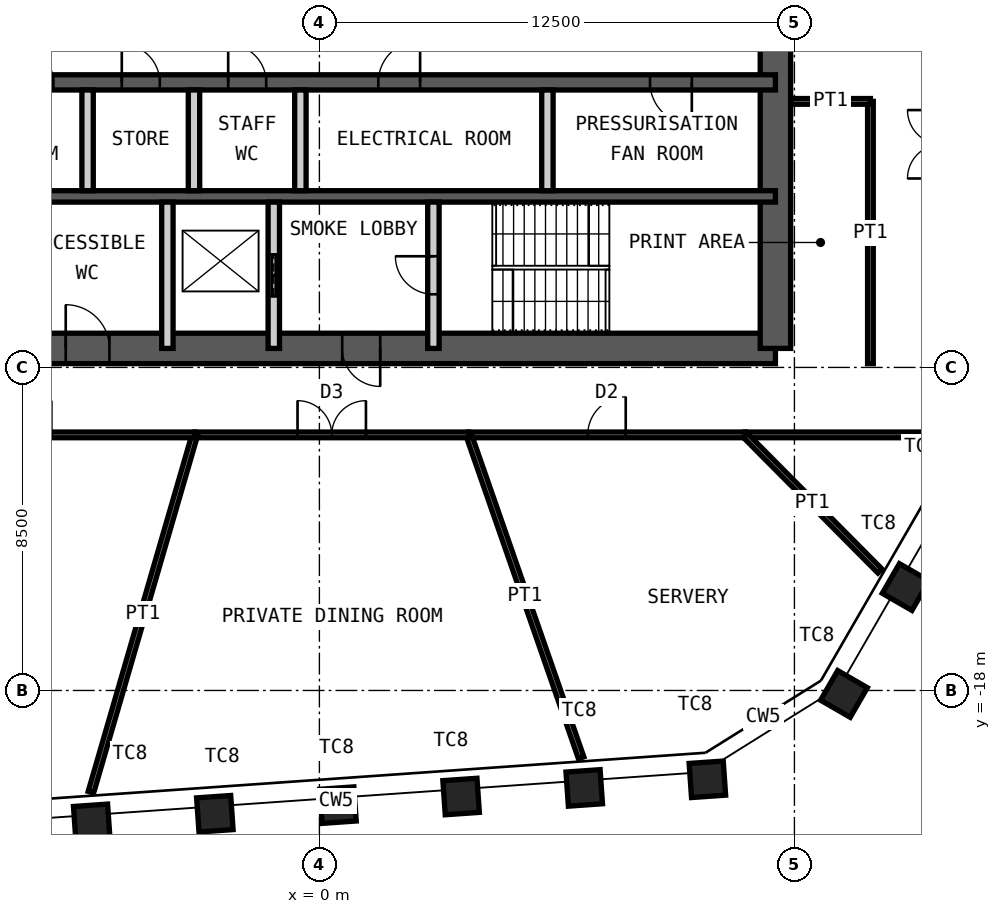
"""IFC4 building model, lengths in metres.
Left out: names, types, materials, properties, quantities, classifications, styles, units other than length and angle.
Written with IfcOpenShell. Run it as: python <this file> out.ifc"""

import sys

from ifc_helpers import new_model, si_unit, direction, frame, frame_2d, origin, origin_2d, place, context, subcontext, project, spatial, rectangle, hollow_rectangle, extrude, element, fill, save


model = new_model("IFC4")
c1 = context("Model", 3, precision=1e-05, world=origin(), true_north=direction((0.0, 1.0)))
c2 = subcontext(c1, "Body", "Model", "MODEL_VIEW")
j1 = project(units=[si_unit("LENGTHUNIT", "METRE"), si_unit("PLANEANGLEUNIT", "RADIAN")], contexts=[c1])
p1 = place(None, origin())
s1 = spatial("IfcSite", under=j1, at=p1, CompositionType="ELEMENT")
p2 = place(p1, origin())
s2 = spatial("IfcBuilding", under=s1, at=p2, CompositionType="ELEMENT")
p3 = place(p2, frame((0.0, 0.0, 320.8)))
s3 = spatial("IfcBuildingStorey", under=s2, at=p3, CompositionType="ELEMENT", Elevation=320.8)
for number, where, z_axis, x_axis in (
    (1, (15.427, -15.279, 0.0), (0.0, 0.0, 1.0), (0.5, 0.866, 0.0)),
    (2, (13.803, -18.092, 0.0), (0.0, 0.0, 1.0), (0.5, 0.866, 0.0)),
    (3, (10.209, -20.337, 0.0), (0.0, 0.0, 1.0), (0.998, 0.07, 0.0)),
    (4, (6.969, -20.564, 0.0), (0.0, 0.0, 1.0), (0.998, 0.07, 0.0)),
    (5, (3.729, -20.791, 0.0), (0.0, 0.0, 1.0), (0.998, 0.07, 0.0)),
    (6, (0.489, -21.017, 0.0), (0.0, 0.0, 1.0), (0.998, 0.07, 0.0)),
    (7, (-2.751, -21.244, 0.0), (0.0, 0.0, 1.0), (0.998, 0.07, 0.0)),
    (8, (-5.991, -21.47, 0.0), (0.0, 0.0, 1.0), (0.998, 0.07, 0.0)),
):
    element("IfcColumn", number, at=place(p3, frame(where, z_axis=z_axis, x_axis=x_axis)), inside=s3, PredefinedType="COLUMN", context=c2, shape_type="SweptSolid", body=[
        extrude(hollow_rectangle(XDim=0.9, YDim=0.9, WallThickness=0.05, at=origin_2d()), origin(), (0.0, 0.0, 1.0), 4.2),
    ])
p4 = place(p3, frame((-12.0, -9.0, 0.0), z_axis=(0.0, 0.0, 1.0), x_axis=(1.0, 0.0, 0.0)))
e9 = element("IfcWall", 9, at=p4, inside=s3, PredefinedType="SHEAR", context=c2, shape_type="SweptSolid", body=[
    extrude(rectangle(XDim=24.0, YDim=0.8, at=frame_2d((12.0, 0.0))), origin(), (0.0, 0.0, 1.0), 4.2),
])
p5 = place(p4, frame((1.35, 0.0, 0.0)))
e10 = element("IfcOpeningElement", 10, at=p5, cuts=e9, PredefinedType="OPENING", context=c2, shape_type="SweptSolid", body=[
    extrude(rectangle(XDim=1.0, YDim=2.1, at=frame_2d((0.5, 1.05))), frame((0.0, 0.41, 0.0), z_axis=(0.0, -1.0, 0.0), x_axis=(1.0, 0.0, 0.0)), (0.0, 0.0, 1.0), 0.82),
])
p6 = place(p4, frame((5.325, 0.0, 0.0)))
e11 = element("IfcOpeningElement", 11, at=p6, cuts=e9, PredefinedType="OPENING", context=c2, shape_type="SweptSolid", body=[
    extrude(rectangle(XDim=1.15, YDim=2.1, at=frame_2d((0.575, 1.05))), frame((0.0, 0.41, 0.0), z_axis=(0.0, -1.0, 0.0), x_axis=(1.0, 0.0, 0.0)), (0.0, 0.0, 1.0), 0.82),
])
p7 = place(p4, frame((12.6, 0.0, 0.0)))
e12 = element("IfcOpeningElement", 12, at=p7, cuts=e9, PredefinedType="OPENING", context=c2, shape_type="SweptSolid", body=[
    extrude(rectangle(XDim=1.0, YDim=2.1, at=frame_2d((0.5, 1.05))), frame((0.0, 0.41, 0.0), z_axis=(0.0, -1.0, 0.0), x_axis=(1.0, 0.0, 0.0)), (0.0, 0.0, 1.0), 0.82),
])
p8 = place(p3, frame((12.0, -9.0, 0.0), z_axis=(0.0, 0.0, 1.0), x_axis=(0.0, 1.0, 0.0)))
e13 = element("IfcWall", 13, at=p8, inside=s3, PredefinedType="SHEAR", context=c2, shape_type="SweptSolid", body=[
    extrude(rectangle(XDim=18.0, YDim=0.8, at=frame_2d((9.0, 0.0))), origin(), (0.0, 0.0, 1.0), 4.2),
])
p9 = place(p8, frame((8.1, 0.0, 0.0)))
e14 = element("IfcOpeningElement", 14, at=p9, cuts=e13, PredefinedType="OPENING", context=c2, shape_type="SweptSolid", body=[
    extrude(rectangle(XDim=1.8, YDim=2.1, at=frame_2d((0.9, 1.05))), frame((0.0, 0.41, 0.0), z_axis=(0.0, -1.0, 0.0), x_axis=(1.0, 0.0, 0.0)), (0.0, 0.0, 1.0), 0.82),
])
p10 = place(p3, frame((-12.0, -2.0, 0.0), z_axis=(0.0, 0.0, 1.0), x_axis=(1.0, 0.0, 0.0)))
e15 = element("IfcWall", 15, at=p10, inside=s3, PredefinedType="SHEAR", context=c2, shape_type="SweptSolid", body=[
    extrude(rectangle(XDim=24.0, YDim=0.4, at=frame_2d((12.0, 0.0))), origin(), (0.0, 0.0, 1.0), 4.2),
])
p11 = place(p10, frame((1.1, 0.0, 0.0)))
e16 = element("IfcOpeningElement", 16, at=p11, cuts=e15, PredefinedType="OPENING", context=c2, shape_type="SweptSolid", body=[
    extrude(rectangle(XDim=1.1, YDim=2.1, at=frame_2d((0.55, 1.05))), frame((0.0, 0.21, 0.0), z_axis=(0.0, -1.0, 0.0), x_axis=(1.0, 0.0, 0.0)), (0.0, 0.0, 1.0), 0.42),
])
p12 = place(p10, frame((13.55, 0.0, 0.0)))
e17 = element("IfcOpeningElement", 17, at=p12, cuts=e15, PredefinedType="OPENING", context=c2, shape_type="SweptSolid", body=[
    extrude(rectangle(XDim=1.1, YDim=2.1, at=frame_2d((0.55, 1.05))), frame((0.0, 0.21, 0.0), z_axis=(0.0, -1.0, 0.0), x_axis=(1.0, 0.0, 0.0)), (0.0, 0.0, 1.0), 0.42),
])
p13 = place(p10, frame((20.7, 0.0, 0.0)))
e18 = element("IfcOpeningElement", 18, at=p13, cuts=e15, PredefinedType="OPENING", context=c2, shape_type="SweptSolid", body=[
    extrude(rectangle(XDim=1.1, YDim=2.1, at=frame_2d((0.55, 1.05))), frame((0.0, 0.21, 0.0), z_axis=(0.0, -1.0, 0.0), x_axis=(1.0, 0.0, 0.0)), (0.0, 0.0, 1.0), 0.42),
])
p14 = place(p10, frame((4.0, 0.0, 0.0)))
e19 = element("IfcOpeningElement", 19, at=p14, cuts=e15, PredefinedType="OPENING", context=c2, shape_type="SweptSolid", body=[
    extrude(rectangle(XDim=1.0, YDim=2.1, at=frame_2d((0.5, 1.05))), frame((0.0, 0.21, 0.0), z_axis=(0.0, -1.0, 0.0), x_axis=(1.0, 0.0, 0.0)), (0.0, 0.0, 1.0), 0.42),
])
p15 = place(p10, frame((6.8, 0.0, 0.0)))
e20 = element("IfcOpeningElement", 20, at=p15, cuts=e15, PredefinedType="OPENING", context=c2, shape_type="SweptSolid", body=[
    extrude(rectangle(XDim=1.0, YDim=2.1, at=frame_2d((0.5, 1.05))), frame((0.0, 0.21, 0.0), z_axis=(0.0, -1.0, 0.0), x_axis=(1.0, 0.0, 0.0)), (0.0, 0.0, 1.0), 0.42),
])
p16 = place(p10, frame((9.6, 0.0, 0.0)))
e21 = element("IfcOpeningElement", 21, at=p16, cuts=e15, PredefinedType="OPENING", context=c2, shape_type="SweptSolid", body=[
    extrude(rectangle(XDim=1.0, YDim=2.1, at=frame_2d((0.5, 1.05))), frame((0.0, 0.21, 0.0), z_axis=(0.0, -1.0, 0.0), x_axis=(1.0, 0.0, 0.0)), (0.0, 0.0, 1.0), 0.42),
])
p17 = place(p3, frame((-12.0, -5.0, 0.0), z_axis=(0.0, 0.0, 1.0), x_axis=(1.0, 0.0, 0.0)))
e22 = element("IfcWall", 22, at=p17, inside=s3, PredefinedType="SHEAR", context=c2, shape_type="SweptSolid", body=[
    extrude(rectangle(XDim=24.0, YDim=0.3, at=frame_2d((12.0, 0.0))), origin(), (0.0, 0.0, 1.0), 4.2),
])
for number, where, z_axis, x_axis in (
    (23, (-6.1, -4.85, 0.0), (0.0, 0.0, 1.0), (0.0, 1.0, 0.0)),
    (24, (-3.3, -4.85, 0.0), (0.0, 0.0, 1.0), (0.0, 1.0, 0.0)),
    (25, (-0.5, -4.85, 0.0), (0.0, 0.0, 1.0), (0.0, 1.0, 0.0)),
    (26, (6.0, -4.85, 0.0), (0.0, 0.0, 1.0), (0.0, 1.0, 0.0)),
):
    element("IfcWall", number, at=place(p3, frame(where, z_axis=z_axis, x_axis=x_axis)), inside=s3, PredefinedType="PARTITIONING", context=c2, shape_type="SweptSolid", body=[
        extrude(rectangle(XDim=2.65, YDim=0.3, at=frame_2d((1.325, 0.0))), origin(), (0.0, 0.0, 1.0), 3.98),
    ])
p18 = place(p3, frame((-4.0, -9.0, 0.0), z_axis=(0.0, 0.0, 1.0), x_axis=(0.0, 1.0, 0.0)))
e27 = element("IfcWall", 27, at=p18, inside=s3, PredefinedType="PARTITIONING", context=c2, shape_type="SweptSolid", body=[
    extrude(rectangle(XDim=3.85, YDim=0.3, at=frame_2d((1.925, 0.0))), origin(), (0.0, 0.0, 1.0), 3.98),
])
p19 = place(p3, frame((-1.2, -9.0, 0.0), z_axis=(0.0, 0.0, 1.0), x_axis=(0.0, 1.0, 0.0)))
e28 = element("IfcWall", 28, at=p19, inside=s3, PredefinedType="PARTITIONING", context=c2, shape_type="SweptSolid", body=[
    extrude(rectangle(XDim=3.85, YDim=0.3, at=frame_2d((1.925, 0.0))), origin(), (0.0, 0.0, 1.0), 3.98),
])
p20 = place(p19, frame((1.375, 0.0, 0.0)))
e29 = element("IfcOpeningElement", 29, at=p20, cuts=e28, PredefinedType="OPENING", context=c2, shape_type="SweptSolid", body=[
    extrude(rectangle(XDim=1.1, YDim=2.4, at=frame_2d((0.55, 1.2))), frame((0.0, 0.16, 0.0), z_axis=(0.0, -1.0, 0.0), x_axis=(1.0, 0.0, 0.0)), (0.0, 0.0, 1.0), 0.32),
])
p21 = place(p3, frame((3.0, -9.0, 0.0), z_axis=(0.0, 0.0, 1.0), x_axis=(0.0, 1.0, 0.0)))
e30 = element("IfcWall", 30, at=p21, inside=s3, PredefinedType="PARTITIONING", context=c2, shape_type="SweptSolid", body=[
    extrude(rectangle(XDim=3.85, YDim=0.3, at=frame_2d((1.925, 0.0))), origin(), (0.0, 0.0, 1.0), 3.98),
])
p22 = place(p21, frame((1.425, 0.0, 0.0)))
e31 = element("IfcOpeningElement", 31, at=p22, cuts=e30, PredefinedType="OPENING", context=c2, shape_type="SweptSolid", body=[
    extrude(rectangle(XDim=1.0, YDim=2.1, at=frame_2d((0.5, 1.05))), frame((0.0, 0.16, 0.0), z_axis=(0.0, -1.0, 0.0), x_axis=(1.0, 0.0, 0.0)), (0.0, 0.0, 1.0), 0.32),
])
p23 = place(p3, frame((16.375, -11.275, 0.0), z_axis=(0.0, 0.0, 1.0), x_axis=(-1.0, 0.0, 0.0)))
e32 = element("IfcWall", 32, at=p23, inside=s3, PredefinedType="PARTITIONING", context=c2, shape_type="SweptSolid", body=[
    extrude(rectangle(XDim=5.181, YDim=0.15, at=frame_2d((2.59, 0.0))), origin(), (0.0, 0.0, 1.0), 4.03),
])
p24 = place(p3, frame((14.751, -14.858, 0.0), z_axis=(0.0, 0.0, 1.0), x_axis=(-0.704539120613, 0.709665151692, 0.0)))
e33 = element("IfcWall", 33, at=p24, inside=s3, PredefinedType="PARTITIONING", context=c2, shape_type="SweptSolid", body=[
    extrude(rectangle(XDim=5.049, YDim=0.15, at=frame_2d((2.524, 0.0))), origin(), (0.0, 0.0, 1.0), 3.33),
])
p25 = place(p3, frame((11.194, -11.275, 0.0), z_axis=(0.0, 0.0, 1.0), x_axis=(-1.0, 0.0, 0.0)))
e34 = element("IfcWall", 34, at=p25, inside=s3, PredefinedType="PARTITIONING", context=c2, shape_type="SweptSolid", body=[
    extrude(rectangle(XDim=7.266, YDim=0.15, at=frame_2d((3.633, 0.0))), origin(), (0.0, 0.0, 1.0), 4.03),
])
p26 = place(p25, frame((3.133, 0.0, 0.0)))
e35 = element("IfcOpeningElement", 35, at=p26, cuts=e34, PredefinedType="OPENING", context=c2, shape_type="SweptSolid", body=[
    extrude(rectangle(XDim=1.0, YDim=2.4, at=frame_2d((0.5, 1.2))), frame((0.0, 0.085, 0.0), z_axis=(0.0, -1.0, 0.0), x_axis=(1.0, 0.0, 0.0)), (0.0, 0.0, 1.0), 0.17),
])
p27 = place(p3, frame((6.888, -19.771, 0.0), z_axis=(0.0, 0.0, 1.0), x_axis=(-0.328987878601, 0.944334144111, 0.0)))
e36 = element("IfcWall", 36, at=p27, inside=s3, PredefinedType="PARTITIONING", context=c2, shape_type="SweptSolid", body=[
    extrude(rectangle(XDim=8.997, YDim=0.15, at=frame_2d((4.499, 0.0))), origin(), (0.0, 0.0, 1.0), 3.33),
])
p28 = place(p3, frame((3.928, -11.275, 0.0), z_axis=(0.0, 0.0, 1.0), x_axis=(-1.0, 0.0, 0.0)))
e37 = element("IfcWall", 37, at=p28, inside=s3, PredefinedType="PARTITIONING", context=c2, shape_type="SweptSolid", body=[
    extrude(rectangle(XDim=7.206, YDim=0.15, at=frame_2d((3.603, 0.0))), origin(), (0.0, 0.0, 1.0), 4.03),
])
p29 = place(p28, frame((2.703, 0.0, 0.0)))
e38 = element("IfcOpeningElement", 38, at=p29, cuts=e37, PredefinedType="OPENING", context=c2, shape_type="SweptSolid", body=[
    extrude(rectangle(XDim=1.8, YDim=2.4, at=frame_2d((0.9, 1.2))), frame((0.0, 0.085, 0.0), z_axis=(0.0, -1.0, 0.0), x_axis=(1.0, 0.0, 0.0)), (0.0, 0.0, 1.0), 0.17),
])
p30 = place(p3, frame((-6.012, -20.676, 0.0), z_axis=(0.0, 0.0, 1.0), x_axis=(0.279197441451, 0.960233715658, 0.0)))
e39 = element("IfcWall", 39, at=p30, inside=s3, PredefinedType="PARTITIONING", context=c2, shape_type="SweptSolid", body=[
    extrude(rectangle(XDim=9.79, YDim=0.15, at=frame_2d((4.895, 0.0))), origin(), (0.0, 0.0, 1.0), 3.33),
])
p31 = place(p3, frame((-3.279, -11.275, 0.0), z_axis=(0.0, 0.0, 1.0), x_axis=(-1.0, 0.0, 0.0)))
e40 = element("IfcWall", 40, at=p31, inside=s3, PredefinedType="PARTITIONING", context=c2, shape_type="SweptSolid", body=[
    extrude(rectangle(XDim=9.349, YDim=0.15, at=frame_2d((4.675, 0.0))), origin(), (0.0, 0.0, 1.0), 4.03),
])
p32 = place(p31, frame((3.775, 0.0, 0.0)))
e41 = element("IfcOpeningElement", 41, at=p32, cuts=e40, PredefinedType="OPENING", context=c2, shape_type="SweptSolid", body=[
    extrude(rectangle(XDim=1.8, YDim=2.4, at=frame_2d((0.9, 1.2))), frame((0.0, 0.085, 0.0), z_axis=(0.0, -1.0, 0.0), x_axis=(1.0, 0.0, 0.0)), (0.0, 0.0, 1.0), 0.17),
])
p33 = place(p3, frame((14.5, -9.4, 0.0), z_axis=(0.0, 0.0, 1.0), x_axis=(0.0, 1.0, 0.0)))
e42 = element("IfcWall", 42, at=p33, inside=s3, PredefinedType="PARTITIONING", context=c2, shape_type="SweptSolid", body=[
    extrude(rectangle(XDim=6.9, YDim=0.15, at=frame_2d((3.45, 0.0))), origin(), (0.0, 0.0, 1.0), 4.03),
])
p34 = place(p3, frame((12.4, -2.5, 0.0), z_axis=(0.0, 0.0, 1.0), x_axis=(1.0, 0.0, 0.0)))
e43 = element("IfcWall", 43, at=p34, inside=s3, PredefinedType="PARTITIONING", context=c2, shape_type="SweptSolid", body=[
    extrude(rectangle(XDim=2.1, YDim=0.15, at=frame_2d((1.05, 0.0))), origin(), (0.0, 0.0, 1.0), 3.33),
])
p35 = place(p6, origin())
e44 = element("IfcDoor", 44, at=p35, inside=s3, OperationType="SINGLE_SWING_RIGHT", PredefinedType="DOOR", context=c2, shape_type="SweptSolid", body=[
    extrude(rectangle(XDim=1.15, YDim=2.1, at=frame_2d((0.575, 1.05))), frame((0.0, 0.025, 0.0), z_axis=(0.0, -1.0, 0.0), x_axis=(1.0, 0.0, 0.0)), (0.0, 0.0, 1.0), 0.05),
])
fill(e11, e44)
p36 = place(p7, origin())
e45 = element("IfcDoor", 45, at=p36, inside=s3, OperationType="SINGLE_SWING_RIGHT", PredefinedType="DOOR", context=c2, shape_type="SweptSolid", body=[
    extrude(rectangle(XDim=1.0, YDim=2.1, at=frame_2d((0.5, 1.05))), frame((0.0, 0.025, 0.0), z_axis=(0.0, -1.0, 0.0), x_axis=(1.0, 0.0, 0.0)), (0.0, 0.0, 1.0), 0.05),
])
fill(e12, e45)
p37 = place(p22, origin())
e46 = element("IfcDoor", 46, at=p37, inside=s3, OperationType="SINGLE_SWING_LEFT", PredefinedType="DOOR", context=c2, shape_type="SweptSolid", body=[
    extrude(rectangle(XDim=1.0, YDim=2.1, at=frame_2d((0.5, 1.05))), frame((0.0, 0.025, 0.0), z_axis=(0.0, -1.0, 0.0), x_axis=(1.0, 0.0, 0.0)), (0.0, 0.0, 1.0), 0.05),
])
fill(e31, e46)
p38 = place(p12, origin())
e47 = element("IfcDoor", 47, at=p38, inside=s3, OperationType="SINGLE_SWING_LEFT", PredefinedType="DOOR", context=c2, shape_type="SweptSolid", body=[
    extrude(rectangle(XDim=1.1, YDim=2.1, at=frame_2d((0.55, 1.05))), frame((0.0, 0.025, 0.0), z_axis=(0.0, -1.0, 0.0), x_axis=(1.0, 0.0, 0.0)), (0.0, 0.0, 1.0), 0.05),
])
fill(e17, e47)
p39 = place(p13, origin())
e48 = element("IfcDoor", 48, at=p39, inside=s3, OperationType="SINGLE_SWING_RIGHT", PredefinedType="DOOR", context=c2, shape_type="SweptSolid", body=[
    extrude(rectangle(XDim=1.1, YDim=2.1, at=frame_2d((0.55, 1.05))), frame((0.0, 0.025, 0.0), z_axis=(0.0, -1.0, 0.0), x_axis=(1.0, 0.0, 0.0)), (0.0, 0.0, 1.0), 0.05),
])
fill(e18, e48)
p40 = place(p20, origin())
e49 = element("IfcDoor", 49, at=p40, inside=s3, OperationType="DOUBLE_DOOR_SLIDING", PredefinedType="DOOR", context=c2, shape_type="SweptSolid", body=[
    extrude(rectangle(XDim=1.1, YDim=2.4, at=frame_2d((0.55, 1.2))), frame((0.0, 0.025, 0.0), z_axis=(0.0, -1.0, 0.0), x_axis=(1.0, 0.0, 0.0)), (0.0, 0.0, 1.0), 0.05),
])
fill(e29, e49)
p41 = place(p14, origin())
e50 = element("IfcDoor", 50, at=p41, inside=s3, OperationType="SINGLE_SWING_RIGHT", PredefinedType="DOOR", context=c2, shape_type="SweptSolid", body=[
    extrude(rectangle(XDim=1.0, YDim=2.1, at=frame_2d((0.5, 1.05))), frame((0.0, 0.025, 0.0), z_axis=(0.0, -1.0, 0.0), x_axis=(1.0, 0.0, 0.0)), (0.0, 0.0, 1.0), 0.05),
])
fill(e19, e50)
p42 = place(p15, origin())
e51 = element("IfcDoor", 51, at=p42, inside=s3, OperationType="SINGLE_SWING_RIGHT", PredefinedType="DOOR", context=c2, shape_type="SweptSolid", body=[
    extrude(rectangle(XDim=1.0, YDim=2.1, at=frame_2d((0.5, 1.05))), frame((0.0, 0.025, 0.0), z_axis=(0.0, -1.0, 0.0), x_axis=(1.0, 0.0, 0.0)), (0.0, 0.0, 1.0), 0.05),
])
fill(e20, e51)
p43 = place(p16, origin())
e52 = element("IfcDoor", 52, at=p43, inside=s3, OperationType="SINGLE_SWING_RIGHT", PredefinedType="DOOR", context=c2, shape_type="SweptSolid", body=[
    extrude(rectangle(XDim=1.0, YDim=2.1, at=frame_2d((0.5, 1.05))), frame((0.0, 0.025, 0.0), z_axis=(0.0, -1.0, 0.0), x_axis=(1.0, 0.0, 0.0)), (0.0, 0.0, 1.0), 0.05),
])
fill(e21, e52)
p44 = place(p26, origin())
e53 = element("IfcDoor", 53, at=p44, inside=s3, OperationType="SINGLE_SWING_LEFT", PredefinedType="DOOR", context=c2, shape_type="SweptSolid", body=[
    extrude(rectangle(XDim=1.0, YDim=2.4, at=frame_2d((0.5, 1.2))), frame((0.0, 0.025, 0.0), z_axis=(0.0, -1.0, 0.0), x_axis=(1.0, 0.0, 0.0)), (0.0, 0.0, 1.0), 0.05),
])
fill(e35, e53)
p45 = place(p29, origin())
e54 = element("IfcDoor", 54, at=p45, inside=s3, OperationType="DOUBLE_DOOR_DOUBLE_SWING", PredefinedType="DOOR", context=c2, shape_type="SweptSolid", body=[
    extrude(rectangle(XDim=1.8, YDim=2.4, at=frame_2d((0.9, 1.2))), frame((0.0, 0.025, 0.0), z_axis=(0.0, -1.0, 0.0), x_axis=(1.0, 0.0, 0.0)), (0.0, 0.0, 1.0), 0.05),
])
fill(e38, e54)
save(model, sys.argv[1])
